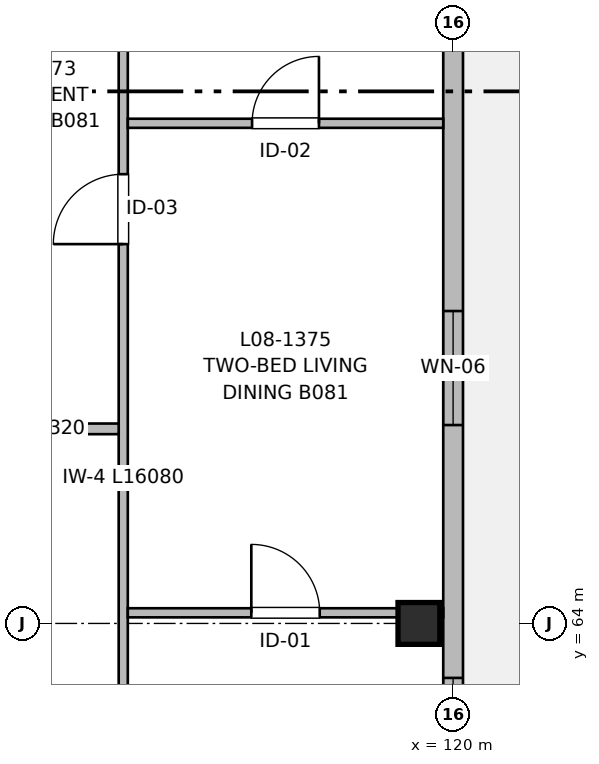
"""IFC4 building model, lengths in metres.
Left out: names, types, materials, properties, quantities, classifications, styles, units other than length and angle.
Written with IfcOpenShell. Run it as: python <this file> out.ifc"""

import sys

from ifc_helpers import new_model, si_unit, direction, frame, frame_2d, origin, origin_2d, place, context, subcontext, project, spatial, rectangle, extrude, element, fill, save


model = new_model("IFC4")
c1 = context("Model", 3, precision=1e-05, world=origin(), true_north=direction((0.0, 1.0)))
c2 = subcontext(c1, "Body", "Model", "MODEL_VIEW")
j1 = project(units=[si_unit("LENGTHUNIT", "METRE"), si_unit("PLANEANGLEUNIT", "RADIAN")], contexts=[c1])
p1 = place(None, origin())
s1 = spatial("IfcSite", under=j1, at=p1, CompositionType="ELEMENT")
p2 = place(p1, origin())
s2 = spatial("IfcBuilding", under=s1, at=p2, CompositionType="ELEMENT")
p3 = place(p2, frame((0.0, 0.0, 26.56)))
s3 = spatial("IfcBuildingStorey", under=s2, at=p3, CompositionType="ELEMENT", Elevation=26.56)
p4 = place(p3, frame((119.55, 64.0, 0.0), z_axis=(0.0, 0.0, 1.0), x_axis=(1.0, 0.0, 0.0)))
e1 = element("IfcColumn", 1, at=p4, inside=s3, PredefinedType="COLUMN", context=c2, shape_type="SweptSolid", body=[
    extrude(rectangle(XDim=0.55, YDim=0.55, at=origin_2d()), origin(), (0.0, 0.0, 1.0), 3.2),
])
p5 = place(p3, frame((120.0, 88.0, 0.0), z_axis=(0.0, 0.0, 1.0), x_axis=(0.0, -1.0, 0.0)))
e2 = element("IfcWall", 2, at=p5, inside=s3, PredefinedType="SOLIDWALL", context=c2, shape_type="SweptSolid", body=[
    extrude(rectangle(XDim=29.0, YDim=0.26, at=frame_2d((14.5, 0.0))), origin(), (0.0, 0.0, 1.0), 2.98),
])
p6 = place(p5, frame((4.233, 0.0, 0.0)))
e3 = element("IfcOpeningElement", 3, at=p6, cuts=e2, PredefinedType="OPENING", context=c2, shape_type="SweptSolid", body=[
    extrude(rectangle(XDim=1.2, YDim=2.2, at=frame_2d((0.6, 1.1))), frame((0.0, 0.14, 0.0), z_axis=(0.0, -1.0, 0.0), x_axis=(1.0, 0.0, 0.0)), (0.0, 0.0, 1.0), 0.28),
])
p7 = place(p5, frame((6.133, 0.0, 0.62)))
e4 = element("IfcOpeningElement", 4, at=p7, cuts=e2, PredefinedType="OPENING", context=c2, shape_type="SweptSolid", body=[
    extrude(rectangle(XDim=1.1, YDim=1.6, at=frame_2d((0.55, 0.8))), frame((0.0, 0.14, 0.0), z_axis=(0.0, -1.0, 0.0), x_axis=(1.0, 0.0, 0.0)), (0.0, 0.0, 1.0), 0.28),
])
p8 = place(p5, frame((13.3, 0.0, 0.72)))
e5 = element("IfcOpeningElement", 5, at=p8, cuts=e2, PredefinedType="OPENING", context=c2, shape_type="SweptSolid", body=[
    extrude(rectangle(XDim=2.4, YDim=1.5, at=frame_2d((1.2, 0.75))), frame((0.0, 0.14, 0.0), z_axis=(0.0, -1.0, 0.0), x_axis=(1.0, 0.0, 0.0)), (0.0, 0.0, 1.0), 0.28),
])
p9 = place(p5, frame((24.717, 0.0, 0.82)))
e6 = element("IfcOpeningElement", 6, at=p9, cuts=e2, PredefinedType="OPENING", context=c2, shape_type="SweptSolid", body=[
    extrude(rectangle(XDim=1.5, YDim=1.4, at=frame_2d((0.75, 0.7))), frame((0.0, 0.14, 0.0), z_axis=(0.0, -1.0, 0.0), x_axis=(1.0, 0.0, 0.0)), (0.0, 0.0, 1.0), 0.28),
])
p10 = place(p5, frame((19.89, 0.0, 0.82)))
e7 = element("IfcOpeningElement", 7, at=p10, cuts=e2, PredefinedType="OPENING", context=c2, shape_type="SweptSolid", body=[
    extrude(rectangle(XDim=1.5, YDim=1.4, at=frame_2d((0.75, 0.7))), frame((0.0, 0.14, 0.0), z_axis=(0.0, -1.0, 0.0), x_axis=(1.0, 0.0, 0.0)), (0.0, 0.0, 1.0), 0.28),
])
p11 = place(p5, frame((9.375, 0.0, 0.82)))
e8 = element("IfcOpeningElement", 8, at=p11, cuts=e2, PredefinedType="OPENING", context=c2, shape_type="SweptSolid", body=[
    extrude(rectangle(XDim=1.5, YDim=1.4, at=frame_2d((0.75, 0.7))), frame((0.0, 0.14, 0.0), z_axis=(0.0, -1.0, 0.0), x_axis=(1.0, 0.0, 0.0)), (0.0, 0.0, 1.0), 0.28),
])
p12 = place(p3, frame((115.66, 59.16, 0.0), z_axis=(0.0, 0.0, 1.0), x_axis=(0.0, 1.0, 0.0)))
e9 = element("IfcWall", 9, at=p12, inside=s3, PredefinedType="PARTITIONING", context=c2, shape_type="SweptSolid", body=[
    extrude(rectangle(XDim=16.08, YDim=0.12, at=frame_2d((8.04, 0.0))), origin(), (0.0, 0.0, 1.0), 2.935),
])
p13 = place(p12, frame((2.812, 0.0, 0.0)))
e10 = element("IfcOpeningElement", 10, at=p13, cuts=e9, PredefinedType="OPENING", context=c2, shape_type="SweptSolid", body=[
    extrude(rectangle(XDim=0.86, YDim=2.1, at=frame_2d((0.43, 1.05))), frame((0.0, 0.07, 0.0), z_axis=(0.0, -1.0, 0.0), x_axis=(1.0, 0.0, 0.0)), (0.0, 0.0, 1.0), 0.14),
])
p14 = place(p12, frame((9.83, 0.0, 0.0)))
e11 = element("IfcOpeningElement", 11, at=p14, cuts=e9, PredefinedType="OPENING", context=c2, shape_type="SweptSolid", body=[
    extrude(rectangle(XDim=0.92, YDim=2.1, at=frame_2d((0.46, 1.05))), frame((0.0, 0.07, 0.0), z_axis=(0.0, -1.0, 0.0), x_axis=(1.0, 0.0, 0.0)), (0.0, 0.0, 1.0), 0.14),
])
p15 = place(p3, frame((113.28, 66.56, 0.0), z_axis=(0.0, 0.0, 1.0), x_axis=(1.0, 0.0, 0.0)))
e12 = element("IfcWall", 12, at=p15, inside=s3, PredefinedType="PARTITIONING", context=c2, shape_type="SweptSolid", body=[
    extrude(rectangle(XDim=2.32, YDim=0.14, at=frame_2d((1.16, 0.0))), origin(), (0.0, 0.0, 1.0), 2.935),
])
p16 = place(p3, frame((115.72, 64.14, 0.0), z_axis=(0.0, 0.0, 1.0), x_axis=(1.0, 0.0, 0.0)))
e13 = element("IfcWall", 13, at=p16, inside=s3, PredefinedType="PARTITIONING", context=c2, shape_type="SweptSolid", body=[
    extrude(rectangle(XDim=4.15, YDim=0.12, at=frame_2d((2.075, 0.0))), origin(), (0.0, 0.0, 1.0), 2.53),
])
p17 = place(p16, frame((1.625, 0.0, 0.0)))
e14 = element("IfcOpeningElement", 14, at=p17, cuts=e13, PredefinedType="OPENING", context=c2, shape_type="SweptSolid", body=[
    extrude(rectangle(XDim=0.9, YDim=2.1, at=frame_2d((0.45, 1.05))), frame((0.0, 0.07, 0.0), z_axis=(0.0, -1.0, 0.0), x_axis=(1.0, 0.0, 0.0)), (0.0, 0.0, 1.0), 0.14),
])
p18 = place(p3, frame((115.72, 70.58, 0.0), z_axis=(0.0, 0.0, 1.0), x_axis=(1.0, 0.0, 0.0)))
e15 = element("IfcWall", 15, at=p18, inside=s3, PredefinedType="PARTITIONING", context=c2, shape_type="SweptSolid", body=[
    extrude(rectangle(XDim=4.15, YDim=0.12, at=frame_2d((2.075, 0.0))), origin(), (0.0, 0.0, 1.0), 2.935),
])
p19 = place(p18, frame((1.635, 0.0, 0.0)))
e16 = element("IfcOpeningElement", 16, at=p19, cuts=e15, PredefinedType="OPENING", context=c2, shape_type="SweptSolid", body=[
    extrude(rectangle(XDim=0.88, YDim=2.1, at=frame_2d((0.44, 1.05))), frame((0.0, 0.07, 0.0), z_axis=(0.0, -1.0, 0.0), x_axis=(1.0, 0.0, 0.0)), (0.0, 0.0, 1.0), 0.14),
])
p20 = place(p9, origin())
e17 = element("IfcWindow", 17, at=p20, inside=s3, PartitioningType="SINGLE_PANEL", PredefinedType="WINDOW", context=c2, shape_type="SweptSolid", body=[
    extrude(rectangle(XDim=1.5, YDim=1.4, at=frame_2d((0.75, 0.7))), frame((0.0, 0.03, 0.0), z_axis=(0.0, -1.0, 0.0), x_axis=(1.0, 0.0, 0.0)), (0.0, 0.0, 1.0), 0.06),
])
fill(e6, e17)
p21 = place(p14, origin())
e18 = element("IfcDoor", 18, at=p21, inside=s3, OperationType="SINGLE_SWING_LEFT", PredefinedType="DOOR", context=c2, shape_type="SweptSolid", body=[
    extrude(rectangle(XDim=0.92, YDim=2.1, at=frame_2d((0.46, 1.05))), frame((0.0, 0.025, 0.0), z_axis=(0.0, -1.0, 0.0), x_axis=(1.0, 0.0, 0.0)), (0.0, 0.0, 1.0), 0.05),
])
fill(e11, e18)
p22 = place(p17, origin())
e19 = element("IfcDoor", 19, at=p22, inside=s3, OperationType="SINGLE_SWING_LEFT", PredefinedType="DOOR", context=c2, shape_type="SweptSolid", body=[
    extrude(rectangle(XDim=0.9, YDim=2.1, at=frame_2d((0.45, 1.05))), frame((0.0, 0.025, 0.0), z_axis=(0.0, -1.0, 0.0), x_axis=(1.0, 0.0, 0.0)), (0.0, 0.0, 1.0), 0.05),
])
fill(e14, e19)
p23 = place(p19, origin())
e20 = element("IfcDoor", 20, at=p23, inside=s3, OperationType="SINGLE_SWING_RIGHT", PredefinedType="DOOR", context=c2, shape_type="SweptSolid", body=[
    extrude(rectangle(XDim=0.88, YDim=2.1, at=frame_2d((0.44, 1.05))), frame((0.0, 0.025, 0.0), z_axis=(0.0, -1.0, 0.0), x_axis=(1.0, 0.0, 0.0)), (0.0, 0.0, 1.0), 0.05),
])
fill(e16, e20)
p24 = place(p10, origin())
e21 = element("IfcWindow", 21, at=p24, inside=s3, PartitioningType="SINGLE_PANEL", PredefinedType="WINDOW", context=c2, shape_type="SweptSolid", body=[
    extrude(rectangle(XDim=1.5, YDim=1.4, at=frame_2d((0.75, 0.7))), frame((0.0, 0.03, 0.0), z_axis=(0.0, -1.0, 0.0), x_axis=(1.0, 0.0, 0.0)), (0.0, 0.0, 1.0), 0.06),
])
fill(e7, e21)
save(model, sys.argv[1])
